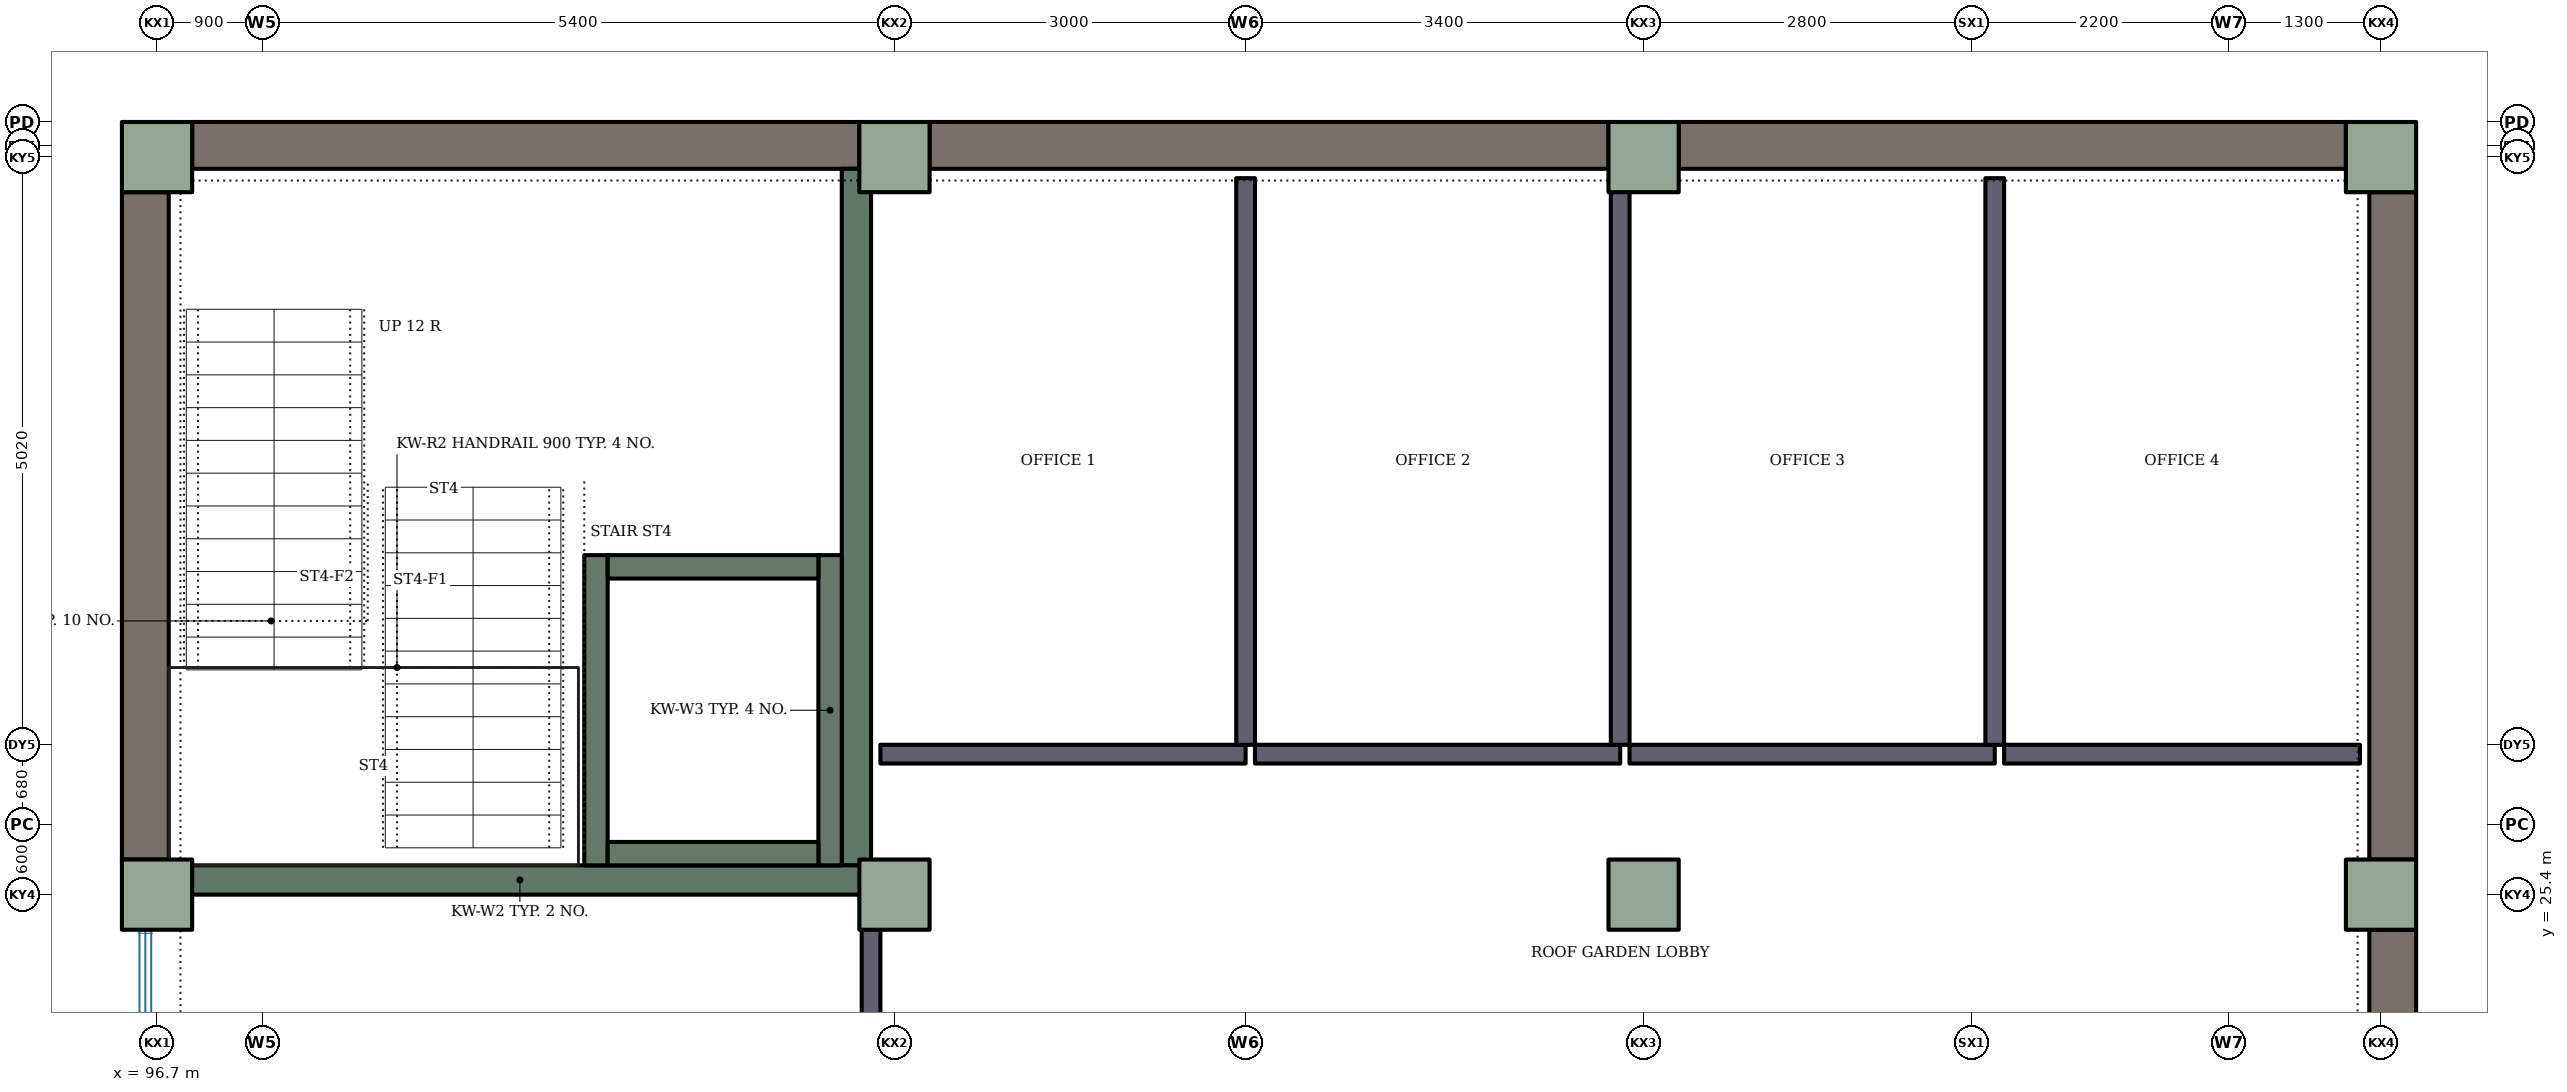
"""IFC4 building model, lengths in metres.
Left out: names, types, materials, properties, quantities, classifications, styles, units other than length and angle.
Written with IfcOpenShell. Run it as: python <this file> out.ifc"""

import sys

from ifc_helpers import new_model, si_unit, direction, frame, frame_2d, origin, origin_2d, place, context, subcontext, project, spatial, rectangle, extrude, element, fill, save


model = new_model("IFC4")
c1 = context("Model", 3, precision=1e-05, world=origin(), true_north=direction((0.0, 1.0)))
c2 = subcontext(c1, "Body", "Model", "MODEL_VIEW")
j1 = project(units=[si_unit("LENGTHUNIT", "METRE"), si_unit("PLANEANGLEUNIT", "RADIAN")], contexts=[c1])
p1 = place(None, origin())
s1 = spatial("IfcSite", under=j1, at=p1, CompositionType="ELEMENT")
p2 = place(p1, origin())
s2 = spatial("IfcBuilding", under=s1, at=p2, CompositionType="ELEMENT")
p3 = place(p2, frame((0.0, 0.0, 8.4)))
s3 = spatial("IfcBuildingStorey", under=s2, at=p3, CompositionType="ELEMENT", Elevation=8.4)
for number, where, z_axis, x_axis in (
    (1, (96.7, 25.4, 0.0), (0.0, 0.0, 1.0), (1.0, 0.0, 0.0)),
    (2, (96.7, 31.7, 0.0), (0.0, 0.0, 1.0), (1.0, 0.0, 0.0)),
    (3, (103.0, 25.4, 0.0), (0.0, 0.0, 1.0), (1.0, 0.0, 0.0)),
    (4, (103.0, 31.7, 0.0), (0.0, 0.0, 1.0), (1.0, 0.0, 0.0)),
    (5, (109.4, 25.4, 0.0), (0.0, 0.0, 1.0), (1.0, 0.0, 0.0)),
    (6, (109.4, 31.7, 0.0), (0.0, 0.0, 1.0), (1.0, 0.0, 0.0)),
    (7, (115.7, 25.4, 0.0), (0.0, 0.0, 1.0), (1.0, 0.0, 0.0)),
    (8, (115.7, 31.7, 0.0), (0.0, 0.0, 1.0), (1.0, 0.0, 0.0)),
):
    element("IfcColumn", number, at=place(p3, frame(where, z_axis=z_axis, x_axis=x_axis)), inside=s3, PredefinedType="COLUMN", context=c2, shape_type="SweptSolid", body=[
        extrude(rectangle(XDim=0.6, YDim=0.6, at=origin_2d()), origin(), (0.0, 0.0, 1.0), 4.2),
    ])
p4 = place(p3, frame((97.0, 31.8, 0.0), z_axis=(0.0, 0.0, 1.0), x_axis=(1.0, 0.0, 0.0)))
e9 = element("IfcWall", 9, at=p4, inside=s3, PredefinedType="SOLIDWALL", context=c2, shape_type="SweptSolid", body=[
    extrude(rectangle(XDim=5.7, YDim=0.4, at=frame_2d((2.85, 0.0))), origin(), (0.0, 0.0, 1.0), 4.2),
])
p5 = place(p3, frame((103.3, 31.8, 0.0), z_axis=(0.0, 0.0, 1.0), x_axis=(1.0, 0.0, 0.0)))
e10 = element("IfcWall", 10, at=p5, inside=s3, PredefinedType="SOLIDWALL", context=c2, shape_type="SweptSolid", body=[
    extrude(rectangle(XDim=5.8, YDim=0.4, at=frame_2d((2.9, 0.0))), origin(), (0.0, 0.0, 1.0), 4.2),
])
p6 = place(p5, frame((0.5, 0.0, 0.9)))
e11 = element("IfcOpeningElement", 11, at=p6, cuts=e10, PredefinedType="OPENING", context=c2, shape_type="SweptSolid", body=[
    extrude(rectangle(XDim=1.2, YDim=2.1, at=frame_2d((0.6, 1.05))), frame((0.0, 0.21, 0.0), z_axis=(0.0, -1.0, 0.0), x_axis=(1.0, 0.0, 0.0)), (0.0, 0.0, 1.0), 0.42),
])
p7 = place(p5, frame((3.7, 0.0, 0.9)))
e12 = element("IfcOpeningElement", 12, at=p7, cuts=e10, PredefinedType="OPENING", context=c2, shape_type="SweptSolid", body=[
    extrude(rectangle(XDim=1.2, YDim=2.1, at=frame_2d((0.6, 1.05))), frame((0.0, 0.21, 0.0), z_axis=(0.0, -1.0, 0.0), x_axis=(1.0, 0.0, 0.0)), (0.0, 0.0, 1.0), 0.42),
])
p8 = place(p3, frame((109.7, 31.8, 0.0), z_axis=(0.0, 0.0, 1.0), x_axis=(1.0, 0.0, 0.0)))
e13 = element("IfcWall", 13, at=p8, inside=s3, PredefinedType="SOLIDWALL", context=c2, shape_type="SweptSolid", body=[
    extrude(rectangle(XDim=5.7, YDim=0.4, at=frame_2d((2.85, 0.0))), origin(), (0.0, 0.0, 1.0), 4.2),
])
p9 = place(p8, frame((0.5, 0.0, 0.9)))
e14 = element("IfcOpeningElement", 14, at=p9, cuts=e13, PredefinedType="OPENING", context=c2, shape_type="SweptSolid", body=[
    extrude(rectangle(XDim=1.2, YDim=2.1, at=frame_2d((0.6, 1.05))), frame((0.0, 0.21, 0.0), z_axis=(0.0, -1.0, 0.0), x_axis=(1.0, 0.0, 0.0)), (0.0, 0.0, 1.0), 0.42),
])
p10 = place(p8, frame((3.7, 0.0, 0.9)))
e15 = element("IfcOpeningElement", 15, at=p10, cuts=e13, PredefinedType="OPENING", context=c2, shape_type="SweptSolid", body=[
    extrude(rectangle(XDim=1.2, YDim=2.1, at=frame_2d((0.6, 1.05))), frame((0.0, 0.21, 0.0), z_axis=(0.0, -1.0, 0.0), x_axis=(1.0, 0.0, 0.0)), (0.0, 0.0, 1.0), 0.42),
])
p11 = place(p3, frame((96.6, 25.7, 0.0), z_axis=(0.0, 0.0, 1.0), x_axis=(0.0, 1.0, 0.0)))
e16 = element("IfcWall", 16, at=p11, inside=s3, PredefinedType="SOLIDWALL", context=c2, shape_type="SweptSolid", body=[
    extrude(rectangle(XDim=5.7, YDim=0.4, at=frame_2d((2.85, 0.0))), origin(), (0.0, 0.0, 1.0), 4.2),
])
p12 = place(p3, frame((115.8, 25.1, 0.0), z_axis=(0.0, 0.0, 1.0), x_axis=(0.0, -1.0, 0.0)))
e17 = element("IfcWall", 17, at=p12, inside=s3, PredefinedType="SOLIDWALL", context=c2, shape_type="SweptSolid", body=[
    extrude(rectangle(XDim=5.8, YDim=0.4, at=frame_2d((2.9, 0.0))), origin(), (0.0, 0.0, 1.0), 4.2),
])
p13 = place(p12, frame((1.7, 0.0, 0.9)))
e18 = element("IfcOpeningElement", 18, at=p13, cuts=e17, PredefinedType="OPENING", context=c2, shape_type="SweptSolid", body=[
    extrude(rectangle(XDim=2.4, YDim=2.7, at=frame_2d((1.2, 1.35))), frame((0.0, 0.21, 0.0), z_axis=(0.0, -1.0, 0.0), x_axis=(1.0, 0.0, 0.0)), (0.0, 0.0, 1.0), 0.42),
])
p14 = place(p3, frame((115.8, 31.4, 0.0), z_axis=(0.0, 0.0, 1.0), x_axis=(0.0, -1.0, 0.0)))
e19 = element("IfcWall", 19, at=p14, inside=s3, PredefinedType="SOLIDWALL", context=c2, shape_type="SweptSolid", body=[
    extrude(rectangle(XDim=5.7, YDim=0.4, at=frame_2d((2.85, 0.0))), origin(), (0.0, 0.0, 1.0), 4.2),
])
p15 = place(p14, frame((1.65, 0.0, 0.9)))
e20 = element("IfcOpeningElement", 20, at=p15, cuts=e19, PredefinedType="OPENING", context=c2, shape_type="SweptSolid", body=[
    extrude(rectangle(XDim=2.4, YDim=2.7, at=frame_2d((1.2, 1.35))), frame((0.0, 0.21, 0.0), z_axis=(0.0, -1.0, 0.0), x_axis=(1.0, 0.0, 0.0)), (0.0, 0.0, 1.0), 0.42),
])
p16 = place(p3, frame((102.675, 25.65, 0.0), z_axis=(0.0, 0.0, 1.0), x_axis=(0.0, 1.0, 0.0)))
e21 = element("IfcWall", 21, at=p16, inside=s3, PredefinedType="SHEAR", context=c2, shape_type="SweptSolid", body=[
    extrude(rectangle(XDim=5.95, YDim=0.25, at=frame_2d((2.975, 0.0))), origin(), (0.0, 0.0, 1.0), 4.2),
])
p17 = place(p16, frame((4.0, 0.0, 0.0)))
e22 = element("IfcOpeningElement", 22, at=p17, cuts=e21, PredefinedType="OPENING", context=c2, shape_type="SweptSolid", body=[
    extrude(rectangle(XDim=1.0, YDim=2.1, at=frame_2d((0.5, 1.05))), frame((0.0, 0.135, 0.0), z_axis=(0.0, -1.0, 0.0), x_axis=(1.0, 0.0, 0.0)), (0.0, 0.0, 1.0), 0.27),
])
p18 = place(p3, frame((96.8, 25.525, 0.0), z_axis=(0.0, 0.0, 1.0), x_axis=(1.0, 0.0, 0.0)))
e23 = element("IfcWall", 23, at=p18, inside=s3, PredefinedType="SHEAR", context=c2, shape_type="SweptSolid", body=[
    extrude(rectangle(XDim=6.0, YDim=0.25, at=frame_2d((3.0, 0.0))), origin(), (0.0, 0.0, 1.0), 4.2),
])
for number, where, z_axis, x_axis in (
    (24, (100.45, 25.65, 0.0), (0.0, 0.0, 1.0), (0.0, 1.0, 0.0)),
    (25, (102.45, 25.65, 0.0), (0.0, 0.0, 1.0), (0.0, 1.0, 0.0)),
):
    element("IfcWall", number, at=place(p3, frame(where, z_axis=z_axis, x_axis=x_axis)), inside=s3, PredefinedType="SHEAR", context=c2, shape_type="SweptSolid", body=[
        extrude(rectangle(XDim=2.65, YDim=0.2, at=frame_2d((1.325, 0.0))), origin(), (0.0, 0.0, 1.0), 4.2),
    ])
p19 = place(p3, frame((100.55, 25.75, 0.0), z_axis=(0.0, 0.0, 1.0), x_axis=(1.0, 0.0, 0.0)))
e26 = element("IfcWall", 26, at=p19, inside=s3, PredefinedType="SHEAR", context=c2, shape_type="SweptSolid", body=[
    extrude(rectangle(XDim=1.8, YDim=0.2, at=frame_2d((0.9, 0.0))), origin(), (0.0, 0.0, 1.0), 4.2),
])
p20 = place(p3, frame((100.55, 28.2, 0.0), z_axis=(0.0, 0.0, 1.0), x_axis=(1.0, 0.0, 0.0)))
e27 = element("IfcWall", 27, at=p20, inside=s3, PredefinedType="SHEAR", context=c2, shape_type="SweptSolid", body=[
    extrude(rectangle(XDim=1.8, YDim=0.2, at=frame_2d((0.9, 0.0))), origin(), (0.0, 0.0, 1.0), 4.2),
])
p21 = place(p20, frame((0.35, 0.0, 0.0)))
e28 = element("IfcOpeningElement", 28, at=p21, cuts=e27, PredefinedType="OPENING", context=c2, shape_type="SweptSolid", body=[
    extrude(rectangle(XDim=1.1, YDim=2.1, at=frame_2d((0.55, 1.05))), frame((0.0, 0.11, 0.0), z_axis=(0.0, -1.0, 0.0), x_axis=(1.0, 0.0, 0.0)), (0.0, 0.0, 1.0), 0.22),
])
p22 = place(p3, frame((102.8, 24.0, 0.0), z_axis=(0.0, 0.0, 1.0), x_axis=(0.0, 1.0, 0.0)))
e29 = element("IfcWall", 29, at=p22, inside=s3, PredefinedType="PARTITIONING", context=c2, shape_type="SweptSolid", body=[
    extrude(rectangle(XDim=1.32, YDim=0.16, at=frame_2d((0.66, 0.0))), origin(), (0.0, 0.0, 1.0), 3.9),
])
p23 = place(p3, frame((103.22, 31.6, 0.0), z_axis=(0.0, 0.0, 1.0), x_axis=(-1.0, 0.0, 0.0)))
e30 = element("IfcWall", 30, at=p23, inside=s3, PredefinedType="PARTITIONING", context=c2, shape_type="SweptSolid", body=[
    extrude(rectangle(XDim=0.34, YDim=0.16, at=frame_2d((0.17, 0.0))), origin(), (0.0, 0.0, 1.0), 3.9),
])
p24 = place(p3, frame((106.0, 26.6, 0.0), z_axis=(0.0, 0.0, 1.0), x_axis=(-1.0, 0.0, 0.0)))
e31 = element("IfcWall", 31, at=p24, inside=s3, PredefinedType="PARTITIONING", context=c2, shape_type="SweptSolid", body=[
    extrude(rectangle(XDim=3.12, YDim=0.16, at=frame_2d((1.56, 0.0))), origin(), (0.0, 0.0, 1.0), 3.9),
])
p25 = place(p24, frame((1.05, 0.0, 0.0)))
e32 = element("IfcOpeningElement", 32, at=p25, cuts=e31, PredefinedType="OPENING", context=c2, shape_type="SweptSolid", body=[
    extrude(rectangle(XDim=1.0, YDim=2.1, at=frame_2d((0.5, 1.05))), frame((0.0, 0.09, 0.0), z_axis=(0.0, -1.0, 0.0), x_axis=(1.0, 0.0, 0.0)), (0.0, 0.0, 1.0), 0.18),
])
p26 = place(p3, frame((106.0, 26.68, 0.0), z_axis=(0.0, 0.0, 1.0), x_axis=(0.0, 1.0, 0.0)))
e33 = element("IfcWall", 33, at=p26, inside=s3, PredefinedType="PARTITIONING", context=c2, shape_type="SweptSolid", body=[
    extrude(rectangle(XDim=4.84, YDim=0.16, at=frame_2d((2.42, 0.0))), origin(), (0.0, 0.0, 1.0), 3.9),
])
p27 = place(p3, frame((109.2, 26.6, 0.0), z_axis=(0.0, 0.0, 1.0), x_axis=(-1.0, 0.0, 0.0)))
e34 = element("IfcWall", 34, at=p27, inside=s3, PredefinedType="PARTITIONING", context=c2, shape_type="SweptSolid", body=[
    extrude(rectangle(XDim=3.12, YDim=0.16, at=frame_2d((1.56, 0.0))), origin(), (0.0, 0.0, 1.0), 3.9),
])
p28 = place(p27, frame((1.05, 0.0, 0.0)))
e35 = element("IfcOpeningElement", 35, at=p28, cuts=e34, PredefinedType="OPENING", context=c2, shape_type="SweptSolid", body=[
    extrude(rectangle(XDim=1.0, YDim=2.1, at=frame_2d((0.5, 1.05))), frame((0.0, 0.09, 0.0), z_axis=(0.0, -1.0, 0.0), x_axis=(1.0, 0.0, 0.0)), (0.0, 0.0, 1.0), 0.18),
])
p29 = place(p3, frame((109.2, 26.68, 0.0), z_axis=(0.0, 0.0, 1.0), x_axis=(0.0, 1.0, 0.0)))
e36 = element("IfcWall", 36, at=p29, inside=s3, PredefinedType="PARTITIONING", context=c2, shape_type="SweptSolid", body=[
    extrude(rectangle(XDim=4.92, YDim=0.16, at=frame_2d((2.46, 0.0))), origin(), (0.0, 0.0, 1.0), 3.9),
])
p30 = place(p3, frame((109.62, 31.6, 0.0), z_axis=(0.0, 0.0, 1.0), x_axis=(-1.0, 0.0, 0.0)))
e37 = element("IfcWall", 37, at=p30, inside=s3, PredefinedType="PARTITIONING", context=c2, shape_type="SweptSolid", body=[
    extrude(rectangle(XDim=0.34, YDim=0.16, at=frame_2d((0.17, 0.0))), origin(), (0.0, 0.0, 1.0), 3.9),
])
p31 = place(p3, frame((112.4, 26.6, 0.0), z_axis=(0.0, 0.0, 1.0), x_axis=(-1.0, 0.0, 0.0)))
e38 = element("IfcWall", 38, at=p31, inside=s3, PredefinedType="PARTITIONING", context=c2, shape_type="SweptSolid", body=[
    extrude(rectangle(XDim=3.12, YDim=0.16, at=frame_2d((1.56, 0.0))), origin(), (0.0, 0.0, 1.0), 3.9),
])
p32 = place(p31, frame((1.05, 0.0, 0.0)))
e39 = element("IfcOpeningElement", 39, at=p32, cuts=e38, PredefinedType="OPENING", context=c2, shape_type="SweptSolid", body=[
    extrude(rectangle(XDim=1.0, YDim=2.1, at=frame_2d((0.5, 1.05))), frame((0.0, 0.09, 0.0), z_axis=(0.0, -1.0, 0.0), x_axis=(1.0, 0.0, 0.0)), (0.0, 0.0, 1.0), 0.18),
])
p33 = place(p3, frame((112.4, 26.68, 0.0), z_axis=(0.0, 0.0, 1.0), x_axis=(0.0, 1.0, 0.0)))
e40 = element("IfcWall", 40, at=p33, inside=s3, PredefinedType="PARTITIONING", context=c2, shape_type="SweptSolid", body=[
    extrude(rectangle(XDim=4.84, YDim=0.16, at=frame_2d((2.42, 0.0))), origin(), (0.0, 0.0, 1.0), 3.9),
])
p34 = place(p3, frame((115.52, 26.6, 0.0), z_axis=(0.0, 0.0, 1.0), x_axis=(-1.0, 0.0, 0.0)))
e41 = element("IfcWall", 41, at=p34, inside=s3, PredefinedType="PARTITIONING", context=c2, shape_type="SweptSolid", body=[
    extrude(rectangle(XDim=3.04, YDim=0.16, at=frame_2d((1.52, 0.0))), origin(), (0.0, 0.0, 1.0), 3.9),
])
p35 = place(p34, frame((1.07, 0.0, 0.0)))
e42 = element("IfcOpeningElement", 42, at=p35, cuts=e41, PredefinedType="OPENING", context=c2, shape_type="SweptSolid", body=[
    extrude(rectangle(XDim=1.0, YDim=2.1, at=frame_2d((0.5, 1.05))), frame((0.0, 0.09, 0.0), z_axis=(0.0, -1.0, 0.0), x_axis=(1.0, 0.0, 0.0)), (0.0, 0.0, 1.0), 0.18),
])
p36 = place(p3, frame((115.6, 25.18, 0.0), z_axis=(0.0, 0.0, 1.0), x_axis=(0.0, 1.0, 0.0)))
e43 = element("IfcWall", 43, at=p36, inside=s3, PredefinedType="PARTITIONING", context=c2, shape_type="SweptSolid", body=[
    extrude(rectangle(XDim=0.44, YDim=0.16, at=frame_2d((0.22, 0.0))), origin(), (0.0, 0.0, 1.0), 3.9),
])
p37 = place(p6, origin())
e44 = element("IfcWindow", 44, at=p37, inside=s3, PartitioningType="SINGLE_PANEL", PredefinedType="WINDOW", context=c2, shape_type="SweptSolid", body=[
    extrude(rectangle(XDim=1.2, YDim=2.1, at=frame_2d((0.6, 1.05))), frame((0.0, 0.03, 0.0), z_axis=(0.0, -1.0, 0.0), x_axis=(1.0, 0.0, 0.0)), (0.0, 0.0, 1.0), 0.06),
])
fill(e11, e44)
p38 = place(p7, origin())
e45 = element("IfcWindow", 45, at=p38, inside=s3, PartitioningType="SINGLE_PANEL", PredefinedType="WINDOW", context=c2, shape_type="SweptSolid", body=[
    extrude(rectangle(XDim=1.2, YDim=2.1, at=frame_2d((0.6, 1.05))), frame((0.0, 0.03, 0.0), z_axis=(0.0, -1.0, 0.0), x_axis=(1.0, 0.0, 0.0)), (0.0, 0.0, 1.0), 0.06),
])
fill(e12, e45)
p39 = place(p9, origin())
e46 = element("IfcWindow", 46, at=p39, inside=s3, PartitioningType="SINGLE_PANEL", PredefinedType="WINDOW", context=c2, shape_type="SweptSolid", body=[
    extrude(rectangle(XDim=1.2, YDim=2.1, at=frame_2d((0.6, 1.05))), frame((0.0, 0.03, 0.0), z_axis=(0.0, -1.0, 0.0), x_axis=(1.0, 0.0, 0.0)), (0.0, 0.0, 1.0), 0.06),
])
fill(e14, e46)
p40 = place(p10, origin())
e47 = element("IfcWindow", 47, at=p40, inside=s3, PartitioningType="SINGLE_PANEL", PredefinedType="WINDOW", context=c2, shape_type="SweptSolid", body=[
    extrude(rectangle(XDim=1.2, YDim=2.1, at=frame_2d((0.6, 1.05))), frame((0.0, 0.03, 0.0), z_axis=(0.0, -1.0, 0.0), x_axis=(1.0, 0.0, 0.0)), (0.0, 0.0, 1.0), 0.06),
])
fill(e15, e47)
p41 = place(p15, origin())
e48 = element("IfcWindow", 48, at=p41, inside=s3, PartitioningType="SINGLE_PANEL", PredefinedType="WINDOW", context=c2, shape_type="SweptSolid", body=[
    extrude(rectangle(XDim=2.4, YDim=2.7, at=frame_2d((1.2, 1.35))), frame((0.0, 0.03, 0.0), z_axis=(0.0, -1.0, 0.0), x_axis=(1.0, 0.0, 0.0)), (0.0, 0.0, 1.0), 0.06),
])
fill(e20, e48)
p42 = place(p21, origin())
e49 = element("IfcDoor", 49, at=p42, inside=s3, OperationType="SLIDING_TO_LEFT", PredefinedType="DOOR", context=c2, shape_type="SweptSolid", body=[
    extrude(rectangle(XDim=1.1, YDim=2.1, at=frame_2d((0.55, 1.05))), frame((0.0, 0.025, 0.0), z_axis=(0.0, -1.0, 0.0), x_axis=(1.0, 0.0, 0.0)), (0.0, 0.0, 1.0), 0.05),
])
fill(e28, e49)
p43 = place(p25, origin())
e50 = element("IfcDoor", 50, at=p43, inside=s3, OperationType="SINGLE_SWING_LEFT", PredefinedType="DOOR", context=c2, shape_type="SweptSolid", body=[
    extrude(rectangle(XDim=1.0, YDim=2.1, at=frame_2d((0.5, 1.05))), frame((0.0, 0.025, 0.0), z_axis=(0.0, -1.0, 0.0), x_axis=(1.0, 0.0, 0.0)), (0.0, 0.0, 1.0), 0.05),
])
fill(e32, e50)
p44 = place(p17, origin())
e51 = element("IfcDoor", 51, at=p44, inside=s3, OperationType="SINGLE_SWING_LEFT", PredefinedType="DOOR", context=c2, shape_type="SweptSolid", body=[
    extrude(rectangle(XDim=1.0, YDim=2.1, at=frame_2d((0.5, 1.05))), frame((0.0, 0.025, 0.0), z_axis=(0.0, -1.0, 0.0), x_axis=(1.0, 0.0, 0.0)), (0.0, 0.0, 1.0), 0.05),
])
fill(e22, e51)
p45 = place(p28, origin())
e52 = element("IfcDoor", 52, at=p45, inside=s3, OperationType="SINGLE_SWING_LEFT", PredefinedType="DOOR", context=c2, shape_type="SweptSolid", body=[
    extrude(rectangle(XDim=1.0, YDim=2.1, at=frame_2d((0.5, 1.05))), frame((0.0, 0.025, 0.0), z_axis=(0.0, -1.0, 0.0), x_axis=(1.0, 0.0, 0.0)), (0.0, 0.0, 1.0), 0.05),
])
fill(e35, e52)
p46 = place(p32, origin())
e53 = element("IfcDoor", 53, at=p46, inside=s3, OperationType="SINGLE_SWING_LEFT", PredefinedType="DOOR", context=c2, shape_type="SweptSolid", body=[
    extrude(rectangle(XDim=1.0, YDim=2.1, at=frame_2d((0.5, 1.05))), frame((0.0, 0.025, 0.0), z_axis=(0.0, -1.0, 0.0), x_axis=(1.0, 0.0, 0.0)), (0.0, 0.0, 1.0), 0.05),
])
fill(e39, e53)
p47 = place(p35, origin())
e54 = element("IfcDoor", 54, at=p47, inside=s3, OperationType="SINGLE_SWING_LEFT", PredefinedType="DOOR", context=c2, shape_type="SweptSolid", body=[
    extrude(rectangle(XDim=1.0, YDim=2.1, at=frame_2d((0.5, 1.05))), frame((0.0, 0.025, 0.0), z_axis=(0.0, -1.0, 0.0), x_axis=(1.0, 0.0, 0.0)), (0.0, 0.0, 1.0), 0.05),
])
fill(e42, e54)
save(model, sys.argv[1])
